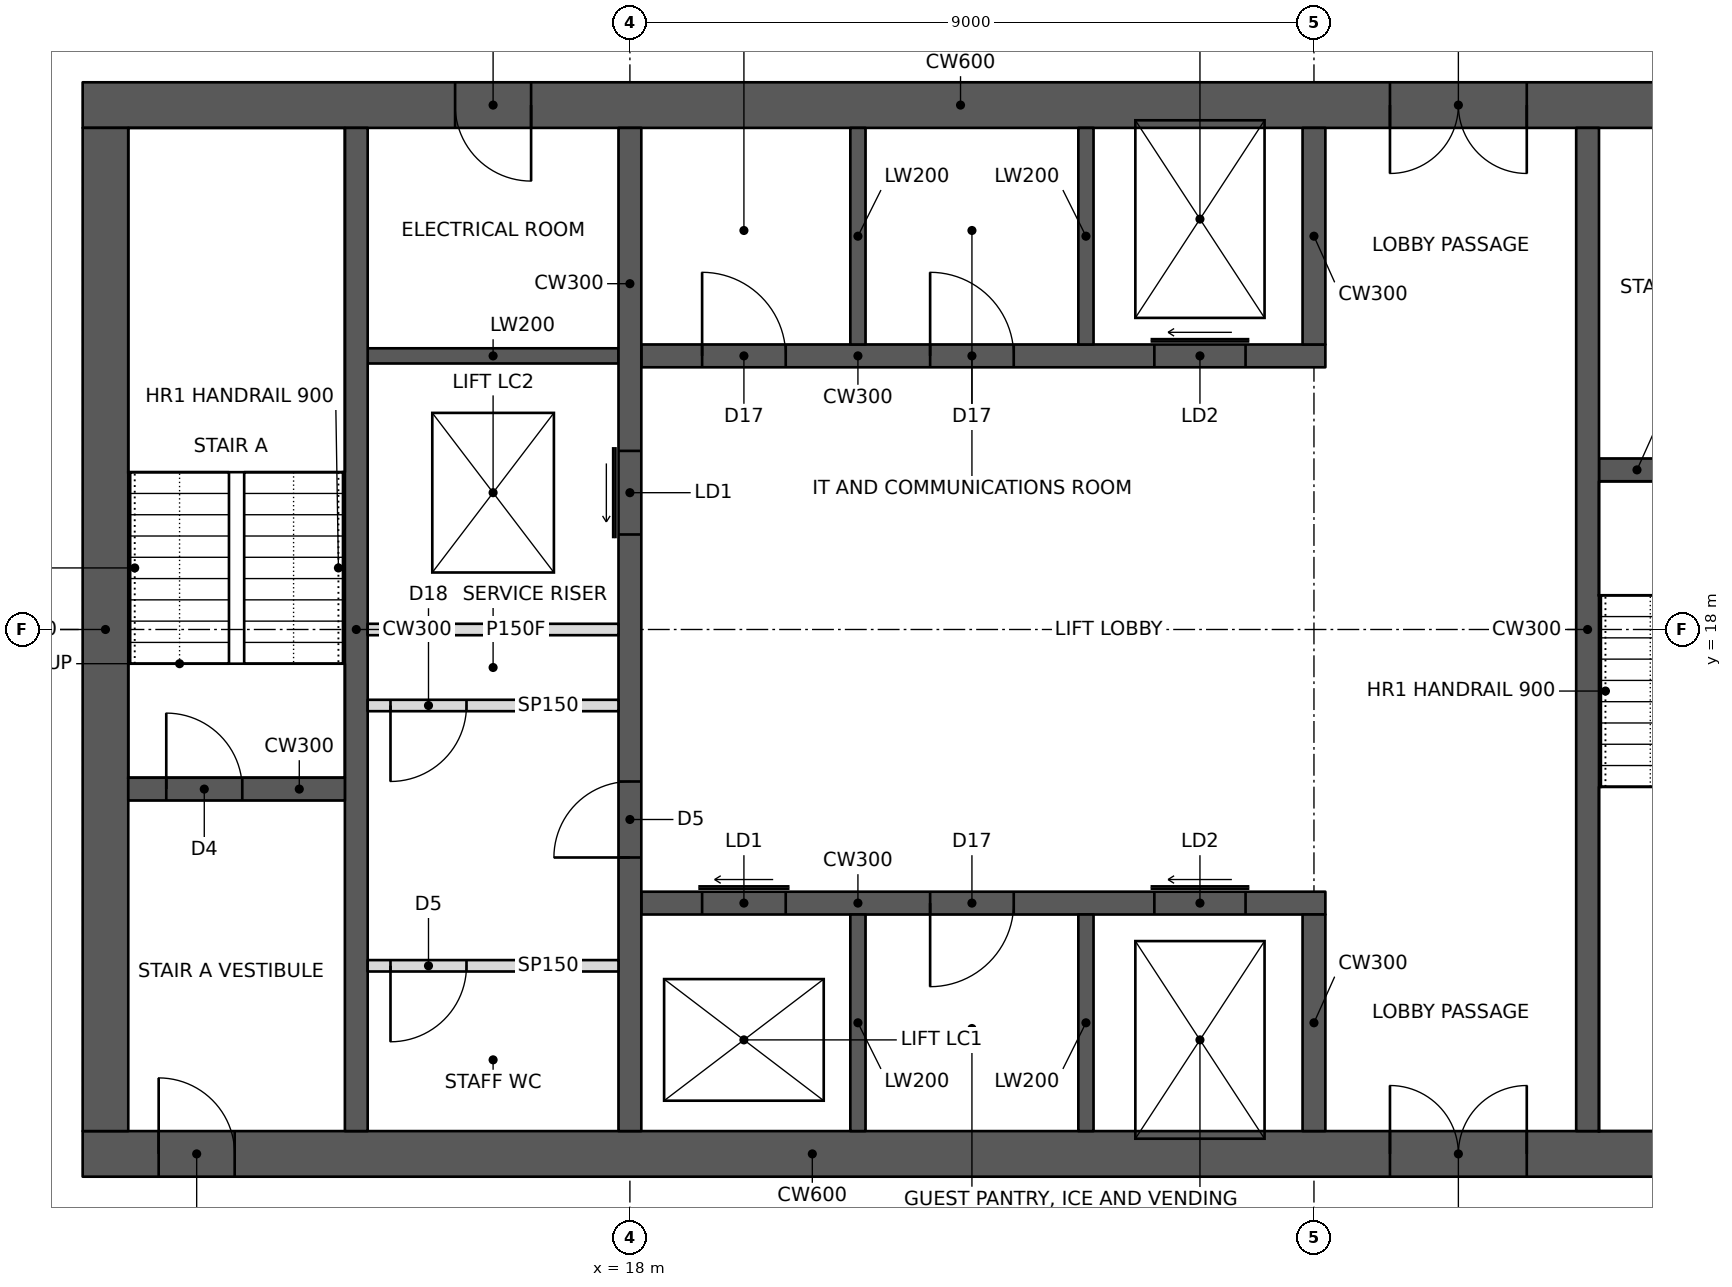
"""IFC4 building model, lengths in metres.
Left out: names, types, materials, properties, quantities, classifications, styles, units other than length and angle.
Written with IfcOpenShell. Run it as: python <this file> out.ifc"""

import sys

from ifc_helpers import new_model, si_unit, direction, frame, frame_2d, origin, place, context, subcontext, project, spatial, rectangle, extrude, element, fill, save


model = new_model("IFC4")
c1 = context("Model", 3, precision=1e-05, world=origin(), true_north=direction((0.0, 1.0)))
c2 = subcontext(c1, "Body", "Model", "MODEL_VIEW")
j1 = project(units=[si_unit("LENGTHUNIT", "METRE"), si_unit("PLANEANGLEUNIT", "RADIAN")], contexts=[c1])
p1 = place(None, origin())
s1 = spatial("IfcSite", under=j1, at=p1, CompositionType="ELEMENT")
p2 = place(p1, origin())
s2 = spatial("IfcBuilding", under=s1, at=p2, CompositionType="ELEMENT")
p3 = place(p2, frame((0.0, 0.0, 184.2)))
s3 = spatial("IfcBuildingStorey", under=s2, at=p3, CompositionType="ELEMENT", Elevation=184.2)
p4 = place(p3, frame((10.8, 11.1, 0.0), z_axis=(0.0, 0.0, 1.0), x_axis=(1.0, 0.0, 0.0)))
e1 = element("IfcWall", 1, at=p4, inside=s3, PredefinedType="SHEAR", context=c2, shape_type="SweptSolid", body=[
    extrude(rectangle(XDim=23.4, YDim=0.6, at=frame_2d((11.7, 0.0))), origin(), (0.0, 0.0, 1.0), 3.4),
])
p5 = place(p4, frame((1.0, 0.0, 0.0)))
e2 = element("IfcOpeningElement", 2, at=p5, cuts=e1, PredefinedType="OPENING", context=c2, shape_type="SweptSolid", body=[
    extrude(rectangle(XDim=1.0, YDim=2.1, at=frame_2d((0.5, 1.05))), frame((0.0, 0.31, 0.0), z_axis=(0.0, -1.0, 0.0), x_axis=(1.0, 0.0, 0.0)), (0.0, 0.0, 1.0), 0.62),
])
p6 = place(p4, frame((17.2, 0.0, 0.0)))
e3 = element("IfcOpeningElement", 3, at=p6, cuts=e1, PredefinedType="OPENING", context=c2, shape_type="SweptSolid", body=[
    extrude(rectangle(XDim=1.8, YDim=2.1, at=frame_2d((0.9, 1.05))), frame((0.0, 0.31, 0.0), z_axis=(0.0, -1.0, 0.0), x_axis=(1.0, 0.0, 0.0)), (0.0, 0.0, 1.0), 0.62),
])
p7 = place(p3, frame((10.8, 24.9, 0.0), z_axis=(0.0, 0.0, 1.0), x_axis=(1.0, 0.0, 0.0)))
e4 = element("IfcWall", 4, at=p7, inside=s3, PredefinedType="SHEAR", context=c2, shape_type="SweptSolid", body=[
    extrude(rectangle(XDim=23.4, YDim=0.6, at=frame_2d((11.7, 0.0))), origin(), (0.0, 0.0, 1.0), 3.4),
])
p8 = place(p7, frame((17.2, 0.0, 0.0)))
e5 = element("IfcOpeningElement", 5, at=p8, cuts=e4, PredefinedType="OPENING", context=c2, shape_type="SweptSolid", body=[
    extrude(rectangle(XDim=1.8, YDim=2.1, at=frame_2d((0.9, 1.05))), frame((0.0, 0.31, 0.0), z_axis=(0.0, -1.0, 0.0), x_axis=(1.0, 0.0, 0.0)), (0.0, 0.0, 1.0), 0.62),
])
p9 = place(p7, frame((21.1, 0.0, 0.0)))
e6 = element("IfcOpeningElement", 6, at=p9, cuts=e4, PredefinedType="OPENING", context=c2, shape_type="SweptSolid", body=[
    extrude(rectangle(XDim=1.0, YDim=2.1, at=frame_2d((0.5, 1.05))), frame((0.0, 0.31, 0.0), z_axis=(0.0, -1.0, 0.0), x_axis=(1.0, 0.0, 0.0)), (0.0, 0.0, 1.0), 0.62),
])
p10 = place(p7, frame((4.9, 0.0, 0.0)))
e7 = element("IfcOpeningElement", 7, at=p10, cuts=e4, PredefinedType="OPENING", context=c2, shape_type="SweptSolid", body=[
    extrude(rectangle(XDim=1.0, YDim=2.1, at=frame_2d((0.5, 1.05))), frame((0.0, 0.31, 0.0), z_axis=(0.0, -1.0, 0.0), x_axis=(1.0, 0.0, 0.0)), (0.0, 0.0, 1.0), 0.62),
])
p11 = place(p3, frame((11.1, 11.4, 0.0), z_axis=(0.0, 0.0, 1.0), x_axis=(0.0, 1.0, 0.0)))
e8 = element("IfcWall", 8, at=p11, inside=s3, PredefinedType="SHEAR", context=c2, shape_type="SweptSolid", body=[
    extrude(rectangle(XDim=13.2, YDim=0.6, at=frame_2d((6.6, 0.0))), origin(), (0.0, 0.0, 1.0), 3.4),
])
p12 = place(p3, frame((14.4, 11.4, 0.0), z_axis=(0.0, 0.0, 1.0), x_axis=(0.0, 1.0, 0.0)))
e9 = element("IfcWall", 9, at=p12, inside=s3, PredefinedType="SHEAR", context=c2, shape_type="SweptSolid", body=[
    extrude(rectangle(XDim=13.2, YDim=0.3, at=frame_2d((6.6, 0.0))), origin(), (0.0, 0.0, 1.0), 3.4),
])
p13 = place(p3, frame((11.4, 15.9, 0.0), z_axis=(0.0, 0.0, 1.0), x_axis=(1.0, 0.0, 0.0)))
e10 = element("IfcWall", 10, at=p13, inside=s3, PredefinedType="SHEAR", context=c2, shape_type="SweptSolid", body=[
    extrude(rectangle(XDim=2.85, YDim=0.3, at=frame_2d((1.425, 0.0))), origin(), (0.0, 0.0, 1.0), 3.4),
])
p14 = place(p13, frame((0.5, 0.0, 0.0)))
e11 = element("IfcOpeningElement", 11, at=p14, cuts=e10, PredefinedType="OPENING", context=c2, shape_type="SweptSolid", body=[
    extrude(rectangle(XDim=1.0, YDim=2.1, at=frame_2d((0.5, 1.05))), frame((0.0, 0.16, 0.0), z_axis=(0.0, -1.0, 0.0), x_axis=(1.0, 0.0, 0.0)), (0.0, 0.0, 1.0), 0.32),
])
p15 = place(p3, frame((18.0, 11.4, 0.0), z_axis=(0.0, 0.0, 1.0), x_axis=(0.0, 1.0, 0.0)))
e12 = element("IfcWall", 12, at=p15, inside=s3, PredefinedType="SHEAR", context=c2, shape_type="SweptSolid", body=[
    extrude(rectangle(XDim=13.2, YDim=0.3, at=frame_2d((6.6, 0.0))), origin(), (0.0, 0.0, 1.0), 3.4),
])
p16 = place(p15, frame((3.6, 0.0, 0.0)))
e13 = element("IfcOpeningElement", 13, at=p16, cuts=e12, PredefinedType="OPENING", context=c2, shape_type="SweptSolid", body=[
    extrude(rectangle(XDim=1.0, YDim=2.1, at=frame_2d((0.5, 1.05))), frame((0.0, 0.16, 0.0), z_axis=(0.0, -1.0, 0.0), x_axis=(1.0, 0.0, 0.0)), (0.0, 0.0, 1.0), 0.32),
])
p17 = place(p15, frame((7.85, 0.0, 0.0)))
e14 = element("IfcOpeningElement", 14, at=p17, cuts=e12, PredefinedType="OPENING", context=c2, shape_type="SweptSolid", body=[
    extrude(rectangle(XDim=1.1, YDim=2.1, at=frame_2d((0.55, 1.05))), frame((0.0, 0.16, 0.0), z_axis=(0.0, -1.0, 0.0), x_axis=(1.0, 0.0, 0.0)), (0.0, 0.0, 1.0), 0.32),
])
p18 = place(p3, frame((14.55, 18.0, 0.0), z_axis=(0.0, 0.0, 1.0), x_axis=(1.0, 0.0, 0.0)))
e15 = element("IfcWall", 15, at=p18, inside=s3, PredefinedType="PARTITIONING", context=c2, shape_type="SweptSolid", body=[
    extrude(rectangle(XDim=3.3, YDim=0.15, at=frame_2d((1.65, 0.0))), origin(), (0.0, 0.0, 1.0), 3.2),
])
p19 = place(p3, frame((18.15, 14.4, 0.0), z_axis=(0.0, 0.0, 1.0), x_axis=(1.0, 0.0, 0.0)))
e16 = element("IfcWall", 16, at=p19, inside=s3, PredefinedType="SHEAR", context=c2, shape_type="SweptSolid", body=[
    extrude(rectangle(XDim=9.0, YDim=0.3, at=frame_2d((4.5, 0.0))), origin(), (0.0, 0.0, 1.0), 3.4),
])
p20 = place(p19, frame((0.8, 0.0, 0.0)))
e17 = element("IfcOpeningElement", 17, at=p20, cuts=e16, PredefinedType="OPENING", context=c2, shape_type="SweptSolid", body=[
    extrude(rectangle(XDim=1.1, YDim=2.1, at=frame_2d((0.55, 1.05))), frame((0.0, 0.16, 0.0), z_axis=(0.0, -1.0, 0.0), x_axis=(1.0, 0.0, 0.0)), (0.0, 0.0, 1.0), 0.32),
])
p21 = place(p19, frame((6.75, 0.0, 0.0)))
e18 = element("IfcOpeningElement", 18, at=p21, cuts=e16, PredefinedType="OPENING", context=c2, shape_type="SweptSolid", body=[
    extrude(rectangle(XDim=1.2, YDim=2.1, at=frame_2d((0.6, 1.05))), frame((0.0, 0.16, 0.0), z_axis=(0.0, -1.0, 0.0), x_axis=(1.0, 0.0, 0.0)), (0.0, 0.0, 1.0), 0.32),
])
p22 = place(p19, frame((3.8, 0.0, 0.0)))
e19 = element("IfcOpeningElement", 19, at=p22, cuts=e16, PredefinedType="OPENING", context=c2, shape_type="SweptSolid", body=[
    extrude(rectangle(XDim=1.1, YDim=2.1, at=frame_2d((0.55, 1.05))), frame((0.0, 0.16, 0.0), z_axis=(0.0, -1.0, 0.0), x_axis=(1.0, 0.0, 0.0)), (0.0, 0.0, 1.0), 0.32),
])
p23 = place(p3, frame((27.0, 11.4, 0.0), z_axis=(0.0, 0.0, 1.0), x_axis=(0.0, 1.0, 0.0)))
e20 = element("IfcWall", 20, at=p23, inside=s3, PredefinedType="SHEAR", context=c2, shape_type="SweptSolid", body=[
    extrude(rectangle(XDim=2.85, YDim=0.3, at=frame_2d((1.425, 0.0))), origin(), (0.0, 0.0, 1.0), 3.4),
])
for number, where, z_axis, x_axis in (
    (21, (21.0, 11.4, 0.0), (0.0, 0.0, 1.0), (0.0, 1.0, 0.0)),
    (22, (24.0, 11.4, 0.0), (0.0, 0.0, 1.0), (0.0, 1.0, 0.0)),
):
    element("IfcWall", number, at=place(p3, frame(where, z_axis=z_axis, x_axis=x_axis)), inside=s3, PredefinedType="SHEAR", context=c2, shape_type="SweptSolid", body=[
        extrude(rectangle(XDim=2.85, YDim=0.2, at=frame_2d((1.425, 0.0))), origin(), (0.0, 0.0, 1.0), 3.4),
    ])
p24 = place(p3, frame((18.15, 21.6, 0.0), z_axis=(0.0, 0.0, 1.0), x_axis=(1.0, 0.0, 0.0)))
e23 = element("IfcWall", 23, at=p24, inside=s3, PredefinedType="SHEAR", context=c2, shape_type="SweptSolid", body=[
    extrude(rectangle(XDim=9.0, YDim=0.3, at=frame_2d((4.5, 0.0))), origin(), (0.0, 0.0, 1.0), 3.4),
])
p25 = place(p24, frame((6.75, 0.0, 0.0)))
e24 = element("IfcOpeningElement", 24, at=p25, cuts=e23, PredefinedType="OPENING", context=c2, shape_type="SweptSolid", body=[
    extrude(rectangle(XDim=1.2, YDim=2.1, at=frame_2d((0.6, 1.05))), frame((0.0, 0.16, 0.0), z_axis=(0.0, -1.0, 0.0), x_axis=(1.0, 0.0, 0.0)), (0.0, 0.0, 1.0), 0.32),
])
p26 = place(p24, frame((0.8, 0.0, 0.0)))
e25 = element("IfcOpeningElement", 25, at=p26, cuts=e23, PredefinedType="OPENING", context=c2, shape_type="SweptSolid", body=[
    extrude(rectangle(XDim=1.1, YDim=2.1, at=frame_2d((0.55, 1.05))), frame((0.0, 0.16, 0.0), z_axis=(0.0, -1.0, 0.0), x_axis=(1.0, 0.0, 0.0)), (0.0, 0.0, 1.0), 0.32),
])
p27 = place(p24, frame((3.8, 0.0, 0.0)))
e26 = element("IfcOpeningElement", 26, at=p27, cuts=e23, PredefinedType="OPENING", context=c2, shape_type="SweptSolid", body=[
    extrude(rectangle(XDim=1.1, YDim=2.1, at=frame_2d((0.55, 1.05))), frame((0.0, 0.16, 0.0), z_axis=(0.0, -1.0, 0.0), x_axis=(1.0, 0.0, 0.0)), (0.0, 0.0, 1.0), 0.32),
])
p28 = place(p3, frame((27.0, 21.75, 0.0), z_axis=(0.0, 0.0, 1.0), x_axis=(0.0, 1.0, 0.0)))
e27 = element("IfcWall", 27, at=p28, inside=s3, PredefinedType="SHEAR", context=c2, shape_type="SweptSolid", body=[
    extrude(rectangle(XDim=2.85, YDim=0.3, at=frame_2d((1.425, 0.0))), origin(), (0.0, 0.0, 1.0), 3.4),
])
for number, where, z_axis, x_axis in (
    (28, (21.0, 21.75, 0.0), (0.0, 0.0, 1.0), (0.0, 1.0, 0.0)),
    (29, (24.0, 21.75, 0.0), (0.0, 0.0, 1.0), (0.0, 1.0, 0.0)),
):
    element("IfcWall", number, at=place(p3, frame(where, z_axis=z_axis, x_axis=x_axis)), inside=s3, PredefinedType="SHEAR", context=c2, shape_type="SweptSolid", body=[
        extrude(rectangle(XDim=2.85, YDim=0.2, at=frame_2d((1.425, 0.0))), origin(), (0.0, 0.0, 1.0), 3.4),
    ])
p29 = place(p3, frame((30.6, 11.4, 0.0), z_axis=(0.0, 0.0, 1.0), x_axis=(0.0, 1.0, 0.0)))
e30 = element("IfcWall", 30, at=p29, inside=s3, PredefinedType="SHEAR", context=c2, shape_type="SweptSolid", body=[
    extrude(rectangle(XDim=13.2, YDim=0.3, at=frame_2d((6.6, 0.0))), origin(), (0.0, 0.0, 1.0), 3.4),
])
p30 = place(p3, frame((30.75, 20.1, 0.0), z_axis=(0.0, 0.0, 1.0), x_axis=(1.0, 0.0, 0.0)))
e31 = element("IfcWall", 31, at=p30, inside=s3, PredefinedType="SHEAR", context=c2, shape_type="SweptSolid", body=[
    extrude(rectangle(XDim=2.85, YDim=0.3, at=frame_2d((1.425, 0.0))), origin(), (0.0, 0.0, 1.0), 3.4),
])
p31 = place(p30, frame((1.15, 0.0, 0.0)))
e32 = element("IfcOpeningElement", 32, at=p31, cuts=e31, PredefinedType="OPENING", context=c2, shape_type="SweptSolid", body=[
    extrude(rectangle(XDim=1.0, YDim=2.1, at=frame_2d((0.5, 1.05))), frame((0.0, 0.16, 0.0), z_axis=(0.0, -1.0, 0.0), x_axis=(1.0, 0.0, 0.0)), (0.0, 0.0, 1.0), 0.32),
])
p32 = place(p3, frame((14.55, 21.6, 0.0), z_axis=(0.0, 0.0, 1.0), x_axis=(1.0, 0.0, 0.0)))
e33 = element("IfcWall", 33, at=p32, inside=s3, PredefinedType="SHEAR", context=c2, shape_type="SweptSolid", body=[
    extrude(rectangle(XDim=3.3, YDim=0.2, at=frame_2d((1.65, 0.0))), origin(), (0.0, 0.0, 1.0), 3.4),
])
p33 = place(p3, frame((14.55, 17.0, 0.0), z_axis=(0.0, 0.0, 1.0), x_axis=(1.0, 0.0, 0.0)))
e34 = element("IfcWall", 34, at=p33, inside=s3, PredefinedType="PARTITIONING", context=c2, shape_type="SweptSolid", body=[
    extrude(rectangle(XDim=3.3, YDim=0.15, at=frame_2d((1.65, 0.0))), origin(), (0.0, 0.0, 1.0), 3.2),
])
p34 = place(p33, frame((0.3, 0.0, 0.0)))
e35 = element("IfcOpeningElement", 35, at=p34, cuts=e34, PredefinedType="OPENING", context=c2, shape_type="SweptSolid", body=[
    extrude(rectangle(XDim=1.0, YDim=2.1, at=frame_2d((0.5, 1.05))), frame((0.0, 0.085, 0.0), z_axis=(0.0, -1.0, 0.0), x_axis=(1.0, 0.0, 0.0)), (0.0, 0.0, 1.0), 0.17),
])
p35 = place(p3, frame((14.55, 13.575, 0.0), z_axis=(0.0, 0.0, 1.0), x_axis=(1.0, 0.0, 0.0)))
e36 = element("IfcWall", 36, at=p35, inside=s3, PredefinedType="PARTITIONING", context=c2, shape_type="SweptSolid", body=[
    extrude(rectangle(XDim=3.3, YDim=0.15, at=frame_2d((1.65, 0.0))), origin(), (0.0, 0.0, 1.0), 3.2),
])
p36 = place(p35, frame((0.3, 0.0, 0.0)))
e37 = element("IfcOpeningElement", 37, at=p36, cuts=e36, PredefinedType="OPENING", context=c2, shape_type="SweptSolid", body=[
    extrude(rectangle(XDim=1.0, YDim=2.1, at=frame_2d((0.5, 1.05))), frame((0.0, 0.085, 0.0), z_axis=(0.0, -1.0, 0.0), x_axis=(1.0, 0.0, 0.0)), (0.0, 0.0, 1.0), 0.17),
])
p37 = place(p34, frame((1.0, 0.0, 0.0), z_axis=(0.0, 0.0, 1.0), x_axis=(-1.0, 0.0, 0.0)))
e38 = element("IfcDoor", 38, at=p37, inside=s3, OperationType="SINGLE_SWING_RIGHT", PredefinedType="DOOR", context=c2, shape_type="SweptSolid", body=[
    extrude(rectangle(XDim=1.0, YDim=2.1, at=frame_2d((0.5, 1.05))), frame((0.0, 0.025, 0.0), z_axis=(0.0, -1.0, 0.0), x_axis=(1.0, 0.0, 0.0)), (0.0, 0.0, 1.0), 0.05),
])
fill(e35, e38)
p38 = place(p36, frame((1.0, 0.0, 0.0), z_axis=(0.0, 0.0, 1.0), x_axis=(-1.0, 0.0, 0.0)))
e39 = element("IfcDoor", 39, at=p38, inside=s3, OperationType="SINGLE_SWING_RIGHT", PredefinedType="DOOR", context=c2, shape_type="SweptSolid", body=[
    extrude(rectangle(XDim=1.0, YDim=2.1, at=frame_2d((0.5, 1.05))), frame((0.0, 0.025, 0.0), z_axis=(0.0, -1.0, 0.0), x_axis=(1.0, 0.0, 0.0)), (0.0, 0.0, 1.0), 0.05),
])
fill(e37, e39)
p39 = place(p5, origin())
e40 = element("IfcDoor", 40, at=p39, inside=s3, OperationType="SINGLE_SWING_LEFT", PredefinedType="DOOR", context=c2, shape_type="SweptSolid", body=[
    extrude(rectangle(XDim=1.0, YDim=2.1, at=frame_2d((0.5, 1.05))), frame((0.0, 0.025, 0.0), z_axis=(0.0, -1.0, 0.0), x_axis=(1.0, 0.0, 0.0)), (0.0, 0.0, 1.0), 0.05),
])
fill(e2, e40)
p40 = place(p14, origin())
e41 = element("IfcDoor", 41, at=p40, inside=s3, OperationType="SINGLE_SWING_LEFT", PredefinedType="DOOR", context=c2, shape_type="SweptSolid", body=[
    extrude(rectangle(XDim=1.0, YDim=2.1, at=frame_2d((0.5, 1.05))), frame((0.0, 0.025, 0.0), z_axis=(0.0, -1.0, 0.0), x_axis=(1.0, 0.0, 0.0)), (0.0, 0.0, 1.0), 0.05),
])
fill(e11, e41)
p41 = place(p6, origin())
e42 = element("IfcDoor", 42, at=p41, inside=s3, OperationType="DOUBLE_DOOR_SINGLE_SWING", PredefinedType="DOOR", context=c2, shape_type="SweptSolid", body=[
    extrude(rectangle(XDim=1.8, YDim=2.1, at=frame_2d((0.9, 1.05))), frame((0.0, 0.025, 0.0), z_axis=(0.0, -1.0, 0.0), x_axis=(1.0, 0.0, 0.0)), (0.0, 0.0, 1.0), 0.05),
])
fill(e3, e42)
p42 = place(p8, frame((1.8, 0.0, 0.0), z_axis=(0.0, 0.0, 1.0), x_axis=(-1.0, 0.0, 0.0)))
e43 = element("IfcDoor", 43, at=p42, inside=s3, OperationType="DOUBLE_DOOR_SINGLE_SWING", PredefinedType="DOOR", context=c2, shape_type="SweptSolid", body=[
    extrude(rectangle(XDim=1.8, YDim=2.1, at=frame_2d((0.9, 1.05))), frame((0.0, 0.025, 0.0), z_axis=(0.0, -1.0, 0.0), x_axis=(1.0, 0.0, 0.0)), (0.0, 0.0, 1.0), 0.05),
])
fill(e5, e43)
p43 = place(p16, origin())
e44 = element("IfcDoor", 44, at=p43, inside=s3, OperationType="SINGLE_SWING_LEFT", PredefinedType="DOOR", context=c2, shape_type="SweptSolid", body=[
    extrude(rectangle(XDim=1.0, YDim=2.1, at=frame_2d((0.5, 1.05))), frame((0.0, 0.025, 0.0), z_axis=(0.0, -1.0, 0.0), x_axis=(1.0, 0.0, 0.0)), (0.0, 0.0, 1.0), 0.05),
])
fill(e13, e44)
p44 = place(p10, frame((1.0, 0.0, 0.0), z_axis=(0.0, 0.0, 1.0), x_axis=(-1.0, 0.0, 0.0)))
e45 = element("IfcDoor", 45, at=p44, inside=s3, OperationType="SINGLE_SWING_LEFT", PredefinedType="DOOR", context=c2, shape_type="SweptSolid", body=[
    extrude(rectangle(XDim=1.0, YDim=2.1, at=frame_2d((0.5, 1.05))), frame((0.0, 0.025, 0.0), z_axis=(0.0, -1.0, 0.0), x_axis=(1.0, 0.0, 0.0)), (0.0, 0.0, 1.0), 0.05),
])
fill(e7, e45)
p45 = place(p20, origin())
e46 = element("IfcDoor", 46, at=p45, inside=s3, OperationType="SLIDING_TO_LEFT", PredefinedType="DOOR", context=c2, shape_type="SweptSolid", body=[
    extrude(rectangle(XDim=1.1, YDim=2.1, at=frame_2d((0.55, 1.05))), frame((0.0, 0.025, 0.0), z_axis=(0.0, -1.0, 0.0), x_axis=(1.0, 0.0, 0.0)), (0.0, 0.0, 1.0), 0.05),
])
fill(e17, e46)
p46 = place(p17, origin())
e47 = element("IfcDoor", 47, at=p46, inside=s3, OperationType="SLIDING_TO_LEFT", PredefinedType="DOOR", context=c2, shape_type="SweptSolid", body=[
    extrude(rectangle(XDim=1.1, YDim=2.1, at=frame_2d((0.55, 1.05))), frame((0.0, 0.025, 0.0), z_axis=(0.0, -1.0, 0.0), x_axis=(1.0, 0.0, 0.0)), (0.0, 0.0, 1.0), 0.05),
])
fill(e14, e47)
p47 = place(p21, origin())
e48 = element("IfcDoor", 48, at=p47, inside=s3, OperationType="SLIDING_TO_LEFT", PredefinedType="DOOR", context=c2, shape_type="SweptSolid", body=[
    extrude(rectangle(XDim=1.2, YDim=2.1, at=frame_2d((0.6, 1.05))), frame((0.0, 0.025, 0.0), z_axis=(0.0, -1.0, 0.0), x_axis=(1.0, 0.0, 0.0)), (0.0, 0.0, 1.0), 0.05),
])
fill(e18, e48)
p48 = place(p25, origin())
e49 = element("IfcDoor", 49, at=p48, inside=s3, OperationType="SLIDING_TO_LEFT", PredefinedType="DOOR", context=c2, shape_type="SweptSolid", body=[
    extrude(rectangle(XDim=1.2, YDim=2.1, at=frame_2d((0.6, 1.05))), frame((0.0, 0.025, 0.0), z_axis=(0.0, -1.0, 0.0), x_axis=(1.0, 0.0, 0.0)), (0.0, 0.0, 1.0), 0.05),
])
fill(e24, e49)
p49 = place(p26, origin())
e50 = element("IfcDoor", 50, at=p49, inside=s3, OperationType="SINGLE_SWING_LEFT", PredefinedType="DOOR", context=c2, shape_type="SweptSolid", body=[
    extrude(rectangle(XDim=1.1, YDim=2.1, at=frame_2d((0.55, 1.05))), frame((0.0, 0.025, 0.0), z_axis=(0.0, -1.0, 0.0), x_axis=(1.0, 0.0, 0.0)), (0.0, 0.0, 1.0), 0.05),
])
fill(e25, e50)
p50 = place(p27, origin())
e51 = element("IfcDoor", 51, at=p50, inside=s3, OperationType="SINGLE_SWING_LEFT", PredefinedType="DOOR", context=c2, shape_type="SweptSolid", body=[
    extrude(rectangle(XDim=1.1, YDim=2.1, at=frame_2d((0.55, 1.05))), frame((0.0, 0.025, 0.0), z_axis=(0.0, -1.0, 0.0), x_axis=(1.0, 0.0, 0.0)), (0.0, 0.0, 1.0), 0.05),
])
fill(e26, e51)
p51 = place(p22, frame((1.1, 0.0, 0.0), z_axis=(0.0, 0.0, 1.0), x_axis=(-1.0, 0.0, 0.0)))
e52 = element("IfcDoor", 52, at=p51, inside=s3, OperationType="SINGLE_SWING_RIGHT", PredefinedType="DOOR", context=c2, shape_type="SweptSolid", body=[
    extrude(rectangle(XDim=1.1, YDim=2.1, at=frame_2d((0.55, 1.05))), frame((0.0, 0.025, 0.0), z_axis=(0.0, -1.0, 0.0), x_axis=(1.0, 0.0, 0.0)), (0.0, 0.0, 1.0), 0.05),
])
fill(e19, e52)
save(model, sys.argv[1])
